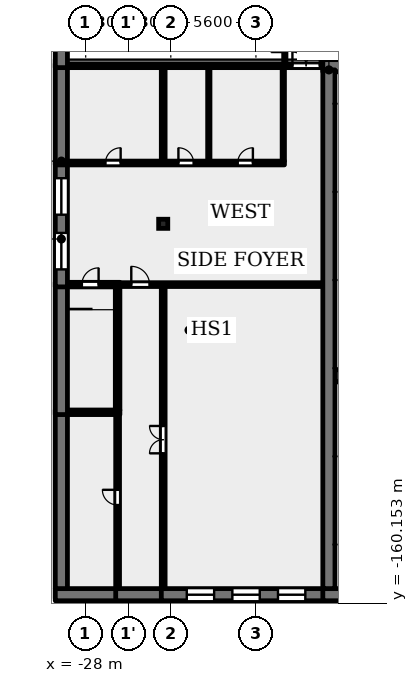
"""IFC4 building model, lengths in metres.
Left out: names, types, materials, properties, quantities, classifications, styles, units other than length and angle.
Written with IfcOpenShell. Run it as: python <this file> out.ifc"""

import sys

from ifc_helpers import new_model, si_unit, direction, frame, frame_2d, origin, origin_2d, place, context, subcontext, project, spatial, rectangle, extrude, element, fill, save


model = new_model("IFC4")
c1 = context("Model", 3, precision=1e-05, world=origin(), true_north=direction((0.0, 1.0)))
c2 = subcontext(c1, "Body", "Model", "MODEL_VIEW")
j1 = project(units=[si_unit("LENGTHUNIT", "METRE"), si_unit("PLANEANGLEUNIT", "RADIAN")], contexts=[c1])
p1 = place(None, origin())
s1 = spatial("IfcSite", under=j1, at=p1, CompositionType="ELEMENT")
p2 = place(p1, origin())
s2 = spatial("IfcBuilding", under=s1, at=p2, CompositionType="ELEMENT")
p3 = place(p2, frame((0.0, 0.0, 20.9)))
s3 = spatial("IfcBuildingStorey", under=s2, at=p3, CompositionType="ELEMENT", Elevation=20.9)
p4 = place(p3, frame((-22.9, -135.2, 0.0), z_axis=(0.0, 0.0, 1.0), x_axis=(1.0, 0.0, 0.0)))
e1 = element("IfcColumn", 1, at=p4, inside=s3, PredefinedType="COLUMN", context=c2, shape_type="SweptSolid", body=[
    extrude(rectangle(XDim=0.6, YDim=0.6, at=origin_2d()), origin(), (0.0, 0.0, 1.0), 4.5),
])
p5 = place(p3, frame((-30.0, -159.6, 0.0), z_axis=(0.0, 0.0, 1.0), x_axis=(1.0, 0.0, 0.0)))
e2 = element("IfcWall", 2, at=p5, inside=s3, PredefinedType="SOLIDWALL", context=c2, shape_type="SweptSolid", body=[
    extrude(rectangle(XDim=4.225, YDim=0.8, at=frame_2d((2.112, 0.0))), origin(), (0.0, 0.0, 1.0), 4.5),
])
p6 = place(p3, frame((-26.025, -159.6, 0.0), z_axis=(0.0, 0.0, 1.0), x_axis=(1.0, 0.0, 0.0)))
e3 = element("IfcWall", 3, at=p6, inside=s3, PredefinedType="SOLIDWALL", context=c2, shape_type="SweptSolid", body=[
    extrude(rectangle(XDim=3.25, YDim=0.8, at=frame_2d((1.625, 0.0))), origin(), (0.0, 0.0, 1.0), 4.5),
])
p7 = place(p3, frame((-23.025, -159.6, 0.0), z_axis=(0.0, 0.0, 1.0), x_axis=(1.0, 0.0, 0.0)))
e4 = element("IfcWall", 4, at=p7, inside=s3, PredefinedType="SOLIDWALL", context=c2, shape_type="SweptSolid", body=[
    extrude(rectangle(XDim=11.425, YDim=0.8, at=frame_2d((5.712, 0.0))), origin(), (0.0, 0.0, 1.0), 4.5),
])
p8 = place(p7, frame((1.675, 0.0, 0.9)))
e5 = element("IfcOpeningElement", 5, at=p8, cuts=e4, PredefinedType="OPENING", context=c2, shape_type="SweptSolid", body=[
    extrude(rectangle(XDim=1.8, YDim=1.5, at=frame_2d((0.9, 0.75))), frame((0.0, 0.41, 0.0), z_axis=(0.0, -1.0, 0.0), x_axis=(1.0, 0.0, 0.0)), (0.0, 0.0, 1.0), 0.82),
])
p9 = place(p7, frame((4.675, 0.0, 0.9)))
e6 = element("IfcOpeningElement", 6, at=p9, cuts=e4, PredefinedType="OPENING", context=c2, shape_type="SweptSolid", body=[
    extrude(rectangle(XDim=1.8, YDim=1.5, at=frame_2d((0.9, 0.75))), frame((0.0, 0.41, 0.0), z_axis=(0.0, -1.0, 0.0), x_axis=(1.0, 0.0, 0.0)), (0.0, 0.0, 1.0), 0.82),
])
p10 = place(p7, frame((7.675, 0.0, 0.9)))
e7 = element("IfcOpeningElement", 7, at=p10, cuts=e4, PredefinedType="OPENING", context=c2, shape_type="SweptSolid", body=[
    extrude(rectangle(XDim=1.8, YDim=1.5, at=frame_2d((0.9, 0.75))), frame((0.0, 0.41, 0.0), z_axis=(0.0, -1.0, 0.0), x_axis=(1.0, 0.0, 0.0)), (0.0, 0.0, 1.0), 0.82),
])
p11 = place(p3, frame((-12.4, -159.6, 0.0), z_axis=(0.0, 0.0, 1.0), x_axis=(1.0, 0.0, 0.0)))
e8 = element("IfcWall", 8, at=p11, inside=s3, PredefinedType="SOLIDWALL", context=c2, shape_type="SweptSolid", body=[
    extrude(rectangle(XDim=24.8, YDim=0.8, at=frame_2d((12.4, 0.0))), origin(), (0.0, 0.0, 1.0), 5.55),
])
p12 = place(p3, frame((-29.2, -147.6, 0.0), z_axis=(0.0, 0.0, 1.0), x_axis=(1.0, 0.0, 0.0)))
e9 = element("IfcWall", 9, at=p12, inside=s3, PredefinedType="SOLIDWALL", context=c2, shape_type="SweptSolid", body=[
    extrude(rectangle(XDim=3.45, YDim=0.3, at=frame_2d((1.725, 0.0))), origin(), (0.0, 0.0, 1.0), 4.5),
])
p13 = place(p3, frame((-11.6, -145.2, 0.0), z_axis=(0.0, 0.0, 1.0), x_axis=(1.0, 0.0, 0.0)))
e10 = element("IfcWall", 10, at=p13, inside=s3, PredefinedType="SOLIDWALL", context=c2, shape_type="SweptSolid", body=[
    extrude(rectangle(XDim=23.2, YDim=0.8, at=frame_2d((11.6, 0.0))), origin(), (0.0, 0.0, 1.0), 5.55),
])
p14 = place(p3, frame((-29.2, -139.2, 0.0), z_axis=(0.0, 0.0, 1.0), x_axis=(1.0, 0.0, 0.0)))
e11 = element("IfcWall", 11, at=p14, inside=s3, PredefinedType="SOLIDWALL", context=c2, shape_type="SweptSolid", body=[
    extrude(rectangle(XDim=3.45, YDim=0.3, at=frame_2d((1.725, 0.0))), origin(), (0.0, 0.0, 1.0), 4.5),
])
p15 = place(p14, frame((0.95, 0.0, 0.0)))
e12 = element("IfcOpeningElement", 12, at=p15, cuts=e11, PredefinedType="OPENING", context=c2, shape_type="SweptSolid", body=[
    extrude(rectangle(XDim=1.1, YDim=2.1, at=frame_2d((0.55, 1.05))), frame((0.0, 0.16, 0.0), z_axis=(0.0, -1.0, 0.0), x_axis=(1.0, 0.0, 0.0)), (0.0, 0.0, 1.0), 0.32),
])
p16 = place(p3, frame((-25.75, -139.2, 0.0), z_axis=(0.0, 0.0, 1.0), x_axis=(1.0, 0.0, 0.0)))
e13 = element("IfcWall", 13, at=p16, inside=s3, PredefinedType="SOLIDWALL", context=c2, shape_type="SweptSolid", body=[
    extrude(rectangle(XDim=13.35, YDim=0.25, at=frame_2d((6.675, 0.0))), origin(), (0.0, 0.0, 1.0), 4.5),
])
p17 = place(p16, frame((0.75, 0.0, 0.0)))
e14 = element("IfcOpeningElement", 14, at=p17, cuts=e13, PredefinedType="OPENING", context=c2, shape_type="SweptSolid", body=[
    extrude(rectangle(XDim=1.2, YDim=2.1, at=frame_2d((0.6, 1.05))), frame((0.0, 0.135, 0.0), z_axis=(0.0, -1.0, 0.0), x_axis=(1.0, 0.0, 0.0)), (0.0, 0.0, 1.0), 0.27),
])
p18 = place(p3, frame((-29.2, -131.2, 0.0), z_axis=(0.0, 0.0, 1.0), x_axis=(1.0, 0.0, 0.0)))
e15 = element("IfcWall", 15, at=p18, inside=s3, PredefinedType="SOLIDWALL", context=c2, shape_type="SweptSolid", body=[
    extrude(rectangle(XDim=14.275, YDim=0.25, at=frame_2d((7.137, 0.0))), origin(), (0.0, 0.0, 1.0), 4.5),
])
p19 = place(p18, frame((2.5, 0.0, 0.0)))
e16 = element("IfcOpeningElement", 16, at=p19, cuts=e15, PredefinedType="OPENING", context=c2, shape_type="SweptSolid", body=[
    extrude(rectangle(XDim=1.0, YDim=2.1, at=frame_2d((0.5, 1.05))), frame((0.0, 0.135, 0.0), z_axis=(0.0, -1.0, 0.0), x_axis=(1.0, 0.0, 0.0)), (0.0, 0.0, 1.0), 0.27),
])
p20 = place(p18, frame((7.3, 0.0, 0.0)))
e17 = element("IfcOpeningElement", 17, at=p20, cuts=e15, PredefinedType="OPENING", context=c2, shape_type="SweptSolid", body=[
    extrude(rectangle(XDim=1.0, YDim=2.1, at=frame_2d((0.5, 1.05))), frame((0.0, 0.135, 0.0), z_axis=(0.0, -1.0, 0.0), x_axis=(1.0, 0.0, 0.0)), (0.0, 0.0, 1.0), 0.27),
])
p21 = place(p18, frame((11.2, 0.0, 0.0)))
e18 = element("IfcOpeningElement", 18, at=p21, cuts=e15, PredefinedType="OPENING", context=c2, shape_type="SweptSolid", body=[
    extrude(rectangle(XDim=1.0, YDim=2.1, at=frame_2d((0.5, 1.05))), frame((0.0, 0.135, 0.0), z_axis=(0.0, -1.0, 0.0), x_axis=(1.0, 0.0, 0.0)), (0.0, 0.0, 1.0), 0.27),
])
p22 = place(p3, frame((-29.2, -124.8, 0.0), z_axis=(0.0, 0.0, 1.0), x_axis=(1.0, 0.0, 0.0)))
e19 = element("IfcWall", 19, at=p22, inside=s3, PredefinedType="SOLIDWALL", context=c2, shape_type="SweptSolid", body=[
    extrude(rectangle(XDim=16.8, YDim=0.25, at=frame_2d((8.4, 0.0))), origin(), (0.0, 0.0, 1.0), 4.5),
])
p23 = place(p22, frame((14.8, 0.0, 0.0)))
e20 = element("IfcOpeningElement", 20, at=p23, cuts=e19, PredefinedType="OPENING", context=c2, shape_type="SweptSolid", body=[
    extrude(rectangle(XDim=1.8, YDim=2.1, at=frame_2d((0.9, 1.05))), frame((0.0, 0.135, 0.0), z_axis=(0.0, -1.0, 0.0), x_axis=(1.0, 0.0, 0.0)), (0.0, 0.0, 1.0), 0.27),
])
p24 = place(p3, frame((-12.4, -124.8, 0.0), z_axis=(0.0, 0.0, 1.0), x_axis=(1.0, 0.0, 0.0)))
e21 = element("IfcWall", 21, at=p24, inside=s3, PredefinedType="SOLIDWALL", context=c2, shape_type="SweptSolid", body=[
    extrude(rectangle(XDim=24.8, YDim=0.8, at=frame_2d((12.4, 0.0))), origin(), (0.0, 0.0, 1.0), 5.55),
])
p25 = place(p3, frame((-29.6, -159.2, 0.0), z_axis=(0.0, 0.0, 1.0), x_axis=(0.0, 1.0, 0.0)))
e22 = element("IfcWall", 22, at=p25, inside=s3, PredefinedType="SOLIDWALL", context=c2, shape_type="SweptSolid", body=[
    extrude(rectangle(XDim=11.75, YDim=0.8, at=frame_2d((5.875, 0.0))), origin(), (0.0, 0.0, 1.0), 4.5),
])
p26 = place(p3, frame((-29.6, -147.75, 0.0), z_axis=(0.0, 0.0, 1.0), x_axis=(0.0, 1.0, 0.0)))
e23 = element("IfcWall", 23, at=p26, inside=s3, PredefinedType="SOLIDWALL", context=c2, shape_type="SweptSolid", body=[
    extrude(rectangle(XDim=8.7, YDim=0.8, at=frame_2d((4.35, 0.0))), origin(), (0.0, 0.0, 1.0), 4.5),
])
p27 = place(p3, frame((-29.6, -139.35, 0.0), z_axis=(0.0, 0.0, 1.0), x_axis=(0.0, 1.0, 0.0)))
e24 = element("IfcWall", 24, at=p27, inside=s3, PredefinedType="SOLIDWALL", context=c2, shape_type="SweptSolid", body=[
    extrude(rectangle(XDim=8.275, YDim=0.8, at=frame_2d((4.137, 0.0))), origin(), (0.0, 0.0, 1.0), 4.5),
])
p28 = place(p27, frame((1.15, 0.0, 0.6)))
e25 = element("IfcOpeningElement", 25, at=p28, cuts=e24, PredefinedType="OPENING", context=c2, shape_type="SweptSolid", body=[
    extrude(rectangle(XDim=2.4, YDim=3.2, at=frame_2d((1.2, 1.6))), frame((0.0, 0.41, 0.0), z_axis=(0.0, -1.0, 0.0), x_axis=(1.0, 0.0, 0.0)), (0.0, 0.0, 1.0), 0.82),
])
p29 = place(p27, frame((4.75, 0.0, 0.6)))
e26 = element("IfcOpeningElement", 26, at=p29, cuts=e24, PredefinedType="OPENING", context=c2, shape_type="SweptSolid", body=[
    extrude(rectangle(XDim=2.4, YDim=3.2, at=frame_2d((1.2, 1.6))), frame((0.0, 0.41, 0.0), z_axis=(0.0, -1.0, 0.0), x_axis=(1.0, 0.0, 0.0)), (0.0, 0.0, 1.0), 0.82),
])
p30 = place(p3, frame((-29.6, -131.325, 0.0), z_axis=(0.0, 0.0, 1.0), x_axis=(0.0, 1.0, 0.0)))
e27 = element("IfcWall", 27, at=p30, inside=s3, PredefinedType="SOLIDWALL", context=c2, shape_type="SweptSolid", body=[
    extrude(rectangle(XDim=6.65, YDim=0.8, at=frame_2d((3.325, 0.0))), origin(), (0.0, 0.0, 1.0), 4.5),
])
p31 = place(p3, frame((-29.6, -124.925, 0.0), z_axis=(0.0, 0.0, 1.0), x_axis=(0.0, 1.0, 0.0)))
e28 = element("IfcWall", 28, at=p31, inside=s3, PredefinedType="SOLIDWALL", context=c2, shape_type="SweptSolid", body=[
    extrude(rectangle(XDim=3.875, YDim=0.8, at=frame_2d((1.938, 0.0))), origin(), (0.0, 0.0, 1.0), 4.5),
])
p32 = place(p3, frame((-25.9, -159.2, 0.0), z_axis=(0.0, 0.0, 1.0), x_axis=(0.0, 1.0, 0.0)))
e29 = element("IfcWall", 29, at=p32, inside=s3, PredefinedType="SOLIDWALL", context=c2, shape_type="SweptSolid", body=[
    extrude(rectangle(XDim=11.45, YDim=0.25, at=frame_2d((5.725, 0.0))), origin(), (0.0, 0.0, 1.0), 4.5),
])
p33 = place(p32, frame((5.5, 0.0, 0.0)))
e30 = element("IfcOpeningElement", 30, at=p33, cuts=e29, PredefinedType="OPENING", context=c2, shape_type="SweptSolid", body=[
    extrude(rectangle(XDim=1.0, YDim=2.1, at=frame_2d((0.5, 1.05))), frame((0.0, 0.135, 0.0), z_axis=(0.0, -1.0, 0.0), x_axis=(1.0, 0.0, 0.0)), (0.0, 0.0, 1.0), 0.27),
])
p34 = place(p3, frame((-25.9, -147.45, 0.0), z_axis=(0.0, 0.0, 1.0), x_axis=(0.0, 1.0, 0.0)))
e31 = element("IfcWall", 31, at=p34, inside=s3, PredefinedType="SOLIDWALL", context=c2, shape_type="SweptSolid", body=[
    extrude(rectangle(XDim=8.225, YDim=0.3, at=frame_2d((4.112, 0.0))), origin(), (0.0, 0.0, 1.0), 4.5),
])
p35 = place(p3, frame((-22.9, -159.2, 0.0), z_axis=(0.0, 0.0, 1.0), x_axis=(0.0, 1.0, 0.0)))
e32 = element("IfcWall", 32, at=p35, inside=s3, PredefinedType="SOLIDWALL", context=c2, shape_type="SweptSolid", body=[
    extrude(rectangle(XDim=19.875, YDim=0.25, at=frame_2d((9.938, 0.0))), origin(), (0.0, 0.0, 1.0), 4.5),
])
p36 = place(p35, frame((8.9, 0.0, 0.0)))
e33 = element("IfcOpeningElement", 33, at=p36, cuts=e32, PredefinedType="OPENING", context=c2, shape_type="SweptSolid", body=[
    extrude(rectangle(XDim=1.8, YDim=2.1, at=frame_2d((0.9, 1.05))), frame((0.0, 0.135, 0.0), z_axis=(0.0, -1.0, 0.0), x_axis=(1.0, 0.0, 0.0)), (0.0, 0.0, 1.0), 0.27),
])
p37 = place(p3, frame((-22.9, -131.075, 0.0), z_axis=(0.0, 0.0, 1.0), x_axis=(0.0, 1.0, 0.0)))
e34 = element("IfcWall", 34, at=p37, inside=s3, PredefinedType="SOLIDWALL", context=c2, shape_type="SweptSolid", body=[
    extrude(rectangle(XDim=6.15, YDim=0.25, at=frame_2d((3.075, 0.0))), origin(), (0.0, 0.0, 1.0), 4.5),
])
for number, where, z_axis, x_axis in (
    (35, (-19.9, -131.075, 0.0), (0.0, 0.0, 1.0), (0.0, 1.0, 0.0)),
    (36, (-15.0, -131.075, 0.0), (0.0, 0.0, 1.0), (0.0, 1.0, 0.0)),
):
    element("IfcWall", number, at=place(p3, frame(where, z_axis=z_axis, x_axis=x_axis)), inside=s3, PredefinedType="PARTITIONING", context=c2, shape_type="SweptSolid", body=[
        extrude(rectangle(XDim=6.15, YDim=0.15, at=frame_2d((3.075, 0.0))), origin(), (0.0, 0.0, 1.0), 4.5),
    ])
p38 = place(p3, frame((-14.9, -124.675, 0.0), z_axis=(0.0, 0.0, 1.0), x_axis=(0.0, 1.0, 0.0)))
e37 = element("IfcWall", 37, at=p38, inside=s3, PredefinedType="PARTITIONING", context=c2, shape_type="SweptSolid", body=[
    extrude(rectangle(XDim=3.325, YDim=0.15, at=frame_2d((1.663, 0.0))), origin(), (0.0, 0.0, 1.0), 4.5),
])
p39 = place(p38, frame((0.775, 0.0, 0.0)))
e38 = element("IfcOpeningElement", 38, at=p39, cuts=e37, PredefinedType="OPENING", context=c2, shape_type="SweptSolid", body=[
    extrude(rectangle(XDim=1.8, YDim=2.1, at=frame_2d((0.9, 1.05))), frame((0.0, 0.085, 0.0), z_axis=(0.0, -1.0, 0.0), x_axis=(1.0, 0.0, 0.0)), (0.0, 0.0, 1.0), 0.17),
])
p40 = place(p3, frame((-12.0, -159.2, 0.0), z_axis=(0.0, 0.0, 1.0), x_axis=(0.0, 1.0, 0.0)))
e39 = element("IfcWall", 39, at=p40, inside=s3, PredefinedType="SOLIDWALL", context=c2, shape_type="SweptSolid", body=[
    extrude(rectangle(XDim=34.125, YDim=0.8, at=frame_2d((17.062, 0.0))), origin(), (0.0, 0.0, 1.0), 5.55),
])
p41 = place(p3, frame((-29.85, -159.85, 4.8), z_axis=(0.0, 0.0, 1.0), x_axis=(0.0, 1.0, 0.0)))
e40 = element("IfcWall", 40, at=p41, inside=s3, PredefinedType="PARAPET", context=c2, shape_type="SweptSolid", body=[
    extrude(rectangle(XDim=35.45, YDim=0.3, at=frame_2d((17.725, 0.0))), origin(), (0.0, 0.0, 1.0), 1.0),
])
p42 = place(p3, frame((-29.7, -159.85, 4.8), z_axis=(0.0, 0.0, 1.0), x_axis=(1.0, 0.0, 0.0)))
e41 = element("IfcWall", 41, at=p42, inside=s3, PredefinedType="PARAPET", context=c2, shape_type="SweptSolid", body=[
    extrude(rectangle(XDim=17.3, YDim=0.3, at=frame_2d((8.65, 0.0))), origin(), (0.0, 0.0, 1.0), 1.0),
])
p43 = place(p28, origin())
e42 = element("IfcWindow", 42, at=p43, inside=s3, PartitioningType="SINGLE_PANEL", PredefinedType="WINDOW", context=c2, shape_type="SweptSolid", body=[
    extrude(rectangle(XDim=2.4, YDim=3.2, at=frame_2d((1.2, 1.6))), frame((0.0, 0.03, 0.0), z_axis=(0.0, -1.0, 0.0), x_axis=(1.0, 0.0, 0.0)), (0.0, 0.0, 1.0), 0.06),
])
fill(e25, e42)
p44 = place(p29, origin())
e43 = element("IfcWindow", 43, at=p44, inside=s3, PartitioningType="SINGLE_PANEL", PredefinedType="WINDOW", context=c2, shape_type="SweptSolid", body=[
    extrude(rectangle(XDim=2.4, YDim=3.2, at=frame_2d((1.2, 1.6))), frame((0.0, 0.03, 0.0), z_axis=(0.0, -1.0, 0.0), x_axis=(1.0, 0.0, 0.0)), (0.0, 0.0, 1.0), 0.06),
])
fill(e26, e43)
p45 = place(p8, origin())
e44 = element("IfcWindow", 44, at=p45, inside=s3, PartitioningType="SINGLE_PANEL", PredefinedType="WINDOW", context=c2, shape_type="SweptSolid", body=[
    extrude(rectangle(XDim=1.8, YDim=1.5, at=frame_2d((0.9, 0.75))), frame((0.0, 0.03, 0.0), z_axis=(0.0, -1.0, 0.0), x_axis=(1.0, 0.0, 0.0)), (0.0, 0.0, 1.0), 0.06),
])
fill(e5, e44)
p46 = place(p9, origin())
e45 = element("IfcWindow", 45, at=p46, inside=s3, PartitioningType="SINGLE_PANEL", PredefinedType="WINDOW", context=c2, shape_type="SweptSolid", body=[
    extrude(rectangle(XDim=1.8, YDim=1.5, at=frame_2d((0.9, 0.75))), frame((0.0, 0.03, 0.0), z_axis=(0.0, -1.0, 0.0), x_axis=(1.0, 0.0, 0.0)), (0.0, 0.0, 1.0), 0.06),
])
fill(e6, e45)
p47 = place(p10, origin())
e46 = element("IfcWindow", 46, at=p47, inside=s3, PartitioningType="SINGLE_PANEL", PredefinedType="WINDOW", context=c2, shape_type="SweptSolid", body=[
    extrude(rectangle(XDim=1.8, YDim=1.5, at=frame_2d((0.9, 0.75))), frame((0.0, 0.03, 0.0), z_axis=(0.0, -1.0, 0.0), x_axis=(1.0, 0.0, 0.0)), (0.0, 0.0, 1.0), 0.06),
])
fill(e7, e46)
p48 = place(p15, origin())
e47 = element("IfcDoor", 47, at=p48, inside=s3, OperationType="SINGLE_SWING_RIGHT", PredefinedType="DOOR", context=c2, shape_type="SweptSolid", body=[
    extrude(rectangle(XDim=1.1, YDim=2.1, at=frame_2d((0.55, 1.05))), frame((0.0, 0.025, 0.0), z_axis=(0.0, -1.0, 0.0), x_axis=(1.0, 0.0, 0.0)), (0.0, 0.0, 1.0), 0.05),
])
fill(e12, e47)
p49 = place(p23, origin())
e48 = element("IfcDoor", 48, at=p49, inside=s3, OperationType="DOUBLE_DOOR_SINGLE_SWING", PredefinedType="DOOR", context=c2, shape_type="SweptSolid", body=[
    extrude(rectangle(XDim=1.8, YDim=2.1, at=frame_2d((0.9, 1.05))), frame((0.0, 0.025, 0.0), z_axis=(0.0, -1.0, 0.0), x_axis=(1.0, 0.0, 0.0)), (0.0, 0.0, 1.0), 0.05),
])
fill(e20, e48)
p50 = place(p19, origin())
e49 = element("IfcDoor", 49, at=p50, inside=s3, OperationType="SINGLE_SWING_RIGHT", PredefinedType="DOOR", context=c2, shape_type="SweptSolid", body=[
    extrude(rectangle(XDim=1.0, YDim=2.1, at=frame_2d((0.5, 1.05))), frame((0.0, 0.025, 0.0), z_axis=(0.0, -1.0, 0.0), x_axis=(1.0, 0.0, 0.0)), (0.0, 0.0, 1.0), 0.05),
])
fill(e16, e49)
p51 = place(p20, origin())
e50 = element("IfcDoor", 50, at=p51, inside=s3, OperationType="SINGLE_SWING_LEFT", PredefinedType="DOOR", context=c2, shape_type="SweptSolid", body=[
    extrude(rectangle(XDim=1.0, YDim=2.1, at=frame_2d((0.5, 1.05))), frame((0.0, 0.025, 0.0), z_axis=(0.0, -1.0, 0.0), x_axis=(1.0, 0.0, 0.0)), (0.0, 0.0, 1.0), 0.05),
])
fill(e17, e50)
p52 = place(p21, origin())
e51 = element("IfcDoor", 51, at=p52, inside=s3, OperationType="SINGLE_SWING_RIGHT", PredefinedType="DOOR", context=c2, shape_type="SweptSolid", body=[
    extrude(rectangle(XDim=1.0, YDim=2.1, at=frame_2d((0.5, 1.05))), frame((0.0, 0.025, 0.0), z_axis=(0.0, -1.0, 0.0), x_axis=(1.0, 0.0, 0.0)), (0.0, 0.0, 1.0), 0.05),
])
fill(e18, e51)
p53 = place(p17, origin())
e52 = element("IfcDoor", 52, at=p53, inside=s3, OperationType="SINGLE_SWING_LEFT", PredefinedType="DOOR", context=c2, shape_type="SweptSolid", body=[
    extrude(rectangle(XDim=1.2, YDim=2.1, at=frame_2d((0.6, 1.05))), frame((0.0, 0.025, 0.0), z_axis=(0.0, -1.0, 0.0), x_axis=(1.0, 0.0, 0.0)), (0.0, 0.0, 1.0), 0.05),
])
fill(e14, e52)
p54 = place(p36, origin())
e53 = element("IfcDoor", 53, at=p54, inside=s3, OperationType="DOUBLE_DOOR_SINGLE_SWING", PredefinedType="DOOR", context=c2, shape_type="SweptSolid", body=[
    extrude(rectangle(XDim=1.8, YDim=2.1, at=frame_2d((0.9, 1.05))), frame((0.0, 0.025, 0.0), z_axis=(0.0, -1.0, 0.0), x_axis=(1.0, 0.0, 0.0)), (0.0, 0.0, 1.0), 0.05),
])
fill(e33, e53)
p55 = place(p33, origin())
e54 = element("IfcDoor", 54, at=p55, inside=s3, OperationType="SINGLE_SWING_RIGHT", PredefinedType="DOOR", context=c2, shape_type="SweptSolid", body=[
    extrude(rectangle(XDim=1.0, YDim=2.1, at=frame_2d((0.5, 1.05))), frame((0.0, 0.025, 0.0), z_axis=(0.0, -1.0, 0.0), x_axis=(1.0, 0.0, 0.0)), (0.0, 0.0, 1.0), 0.05),
])
fill(e30, e54)
save(model, sys.argv[1])
